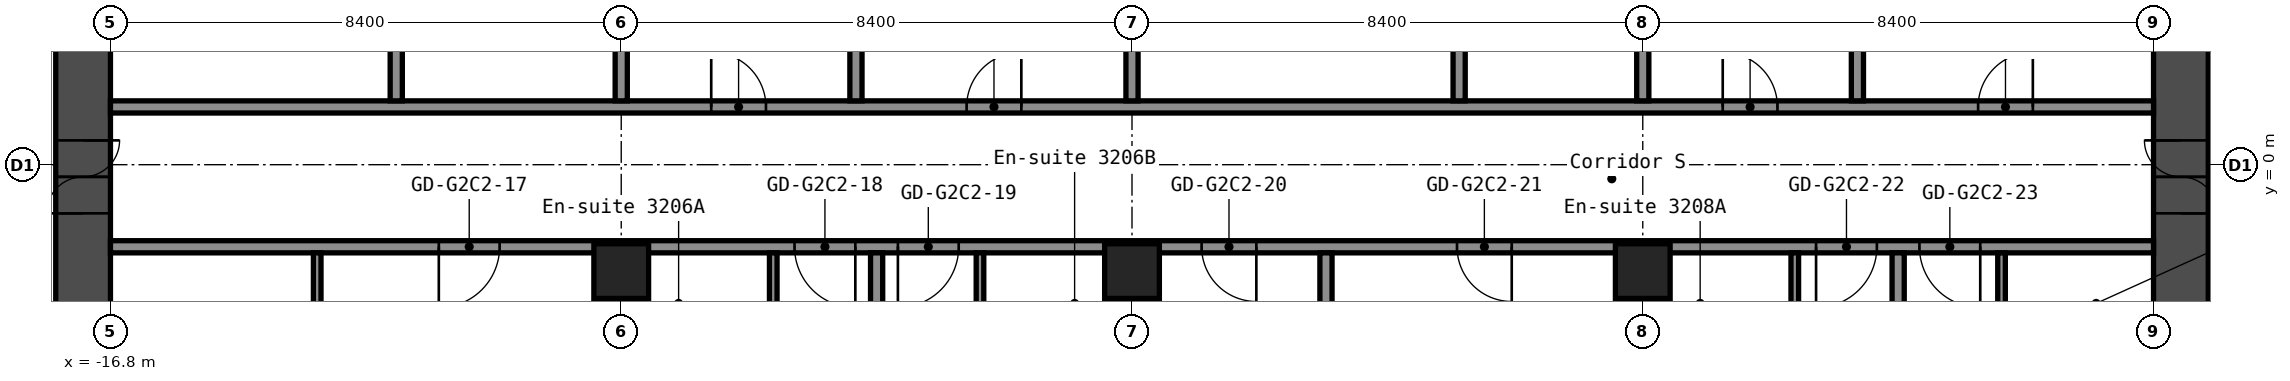
"""IFC4 building model, lengths in metres.
Left out: names, types, materials, properties, quantities, classifications, styles, units other than length and angle.
Written with IfcOpenShell. Run it as: python <this file> out.ifc"""

import sys

from ifc_helpers import new_model, si_unit, direction, frame, frame_2d, origin, origin_2d, place, context, subcontext, project, spatial, rectangle, hollow_rectangle, extrude, element, fill, save


model = new_model("IFC4")
c1 = context("Model", 3, precision=1e-05, world=origin(), true_north=direction((0.0, 1.0)))
c2 = subcontext(c1, "Body", "Model", "MODEL_VIEW")
j1 = project(units=[si_unit("LENGTHUNIT", "METRE"), si_unit("PLANEANGLEUNIT", "RADIAN")], contexts=[c1])
p1 = place(None, origin())
s1 = spatial("IfcSite", under=j1, at=p1, CompositionType="ELEMENT")
p2 = place(p1, origin())
s2 = spatial("IfcBuilding", under=s1, at=p2, CompositionType="ELEMENT")
p3 = place(p2, frame((0.0, 0.0, 113.8)))
s3 = spatial("IfcBuildingStorey", under=s2, at=p3, CompositionType="ELEMENT", Elevation=113.8)
for number, where, z_axis, x_axis in (
    (1, (-8.4, -1.75, 0.0), (0.0, 0.0, 1.0), (1.0, 0.0, 0.0)),
    (2, (0.0, -1.75, 0.0), (0.0, 0.0, 1.0), (1.0, 0.0, 0.0)),
    (3, (8.4, -1.75, 0.0), (0.0, 0.0, 1.0), (1.0, 0.0, 0.0)),
):
    element("IfcColumn", number, at=place(p3, frame(where, z_axis=z_axis, x_axis=x_axis)), inside=s3, PredefinedType="COLUMN", context=c2, shape_type="SweptSolid", body=[
        extrude(hollow_rectangle(XDim=0.9, YDim=0.9, WallThickness=0.036, at=origin_2d()), origin(), (0.0, 0.0, 1.0), 2.8),
    ])
p4 = place(p3, frame((-17.25, -8.4, 0.0), z_axis=(0.0, 0.0, 1.0), x_axis=(0.0, 1.0, 0.0)))
e4 = element("IfcWall", 4, at=p4, inside=s3, PredefinedType="SHEAR", context=c2, shape_type="SweptSolid", body=[
    extrude(rectangle(XDim=16.8, YDim=0.9, at=frame_2d((8.4, 0.0))), origin(), (0.0, 0.0, 1.0), 2.8),
])
p5 = place(p4, frame((7.6, 0.0, 0.0)))
e5 = element("IfcOpeningElement", 5, at=p5, cuts=e4, PredefinedType="OPENING", context=c2, shape_type="SweptSolid", body=[
    extrude(rectangle(XDim=1.2, YDim=2.1, at=frame_2d((0.6, 1.05))), frame((0.0, 0.46, 0.0), z_axis=(0.0, -1.0, 0.0), x_axis=(1.0, 0.0, 0.0)), (0.0, 0.0, 1.0), 0.92),
])
p6 = place(p3, frame((17.25, -8.4, 0.0), z_axis=(0.0, 0.0, 1.0), x_axis=(0.0, 1.0, 0.0)))
e6 = element("IfcWall", 6, at=p6, inside=s3, PredefinedType="SHEAR", context=c2, shape_type="SweptSolid", body=[
    extrude(rectangle(XDim=16.8, YDim=0.9, at=frame_2d((8.4, 0.0))), origin(), (0.0, 0.0, 1.0), 2.8),
])
p7 = place(p6, frame((7.6, 0.0, 0.0)))
e7 = element("IfcOpeningElement", 7, at=p7, cuts=e6, PredefinedType="OPENING", context=c2, shape_type="SweptSolid", body=[
    extrude(rectangle(XDim=1.2, YDim=2.1, at=frame_2d((0.6, 1.05))), frame((0.0, 0.46, 0.0), z_axis=(0.0, -1.0, 0.0), x_axis=(1.0, 0.0, 0.0)), (0.0, 0.0, 1.0), 0.92),
])
p8 = place(p3, frame((-16.8, -1.35, 0.0), z_axis=(0.0, 0.0, 1.0), x_axis=(1.0, 0.0, 0.0)))
e8 = element("IfcWall", 8, at=p8, inside=s3, PredefinedType="PARTITIONING", context=c2, shape_type="SweptSolid", body=[
    extrude(rectangle(XDim=33.6, YDim=0.2, at=frame_2d((16.8, 0.0))), origin(), (0.0, 0.0, 1.0), 2.8),
])
p9 = place(p8, frame((5.4, 0.0, 0.0)))
e9 = element("IfcOpeningElement", 9, at=p9, cuts=e8, PredefinedType="OPENING", context=c2, shape_type="SweptSolid", body=[
    extrude(rectangle(XDim=1.0, YDim=2.1, at=frame_2d((0.5, 1.05))), frame((0.0, 0.11, 0.0), z_axis=(0.0, -1.0, 0.0), x_axis=(1.0, 0.0, 0.0)), (0.0, 0.0, 1.0), 0.22),
])
p10 = place(p8, frame((11.25, 0.0, 0.0)))
e10 = element("IfcOpeningElement", 10, at=p10, cuts=e8, PredefinedType="OPENING", context=c2, shape_type="SweptSolid", body=[
    extrude(rectangle(XDim=1.0, YDim=2.1, at=frame_2d((0.5, 1.05))), frame((0.0, 0.11, 0.0), z_axis=(0.0, -1.0, 0.0), x_axis=(1.0, 0.0, 0.0)), (0.0, 0.0, 1.0), 0.22),
])
p11 = place(p8, frame((12.95, 0.0, 0.0)))
e11 = element("IfcOpeningElement", 11, at=p11, cuts=e8, PredefinedType="OPENING", context=c2, shape_type="SweptSolid", body=[
    extrude(rectangle(XDim=1.0, YDim=2.1, at=frame_2d((0.5, 1.05))), frame((0.0, 0.11, 0.0), z_axis=(0.0, -1.0, 0.0), x_axis=(1.0, 0.0, 0.0)), (0.0, 0.0, 1.0), 0.22),
])
p12 = place(p8, frame((17.945, 0.0, 0.0)))
e12 = element("IfcOpeningElement", 12, at=p12, cuts=e8, PredefinedType="OPENING", context=c2, shape_type="SweptSolid", body=[
    extrude(rectangle(XDim=0.9, YDim=2.1, at=frame_2d((0.45, 1.05))), frame((0.0, 0.11, 0.0), z_axis=(0.0, -1.0, 0.0), x_axis=(1.0, 0.0, 0.0)), (0.0, 0.0, 1.0), 0.22),
])
p13 = place(p8, frame((22.145, 0.0, 0.0)))
e13 = element("IfcOpeningElement", 13, at=p13, cuts=e8, PredefinedType="OPENING", context=c2, shape_type="SweptSolid", body=[
    extrude(rectangle(XDim=0.9, YDim=2.1, at=frame_2d((0.45, 1.05))), frame((0.0, 0.11, 0.0), z_axis=(0.0, -1.0, 0.0), x_axis=(1.0, 0.0, 0.0)), (0.0, 0.0, 1.0), 0.22),
])
p14 = place(p8, frame((28.05, 0.0, 0.0)))
e14 = element("IfcOpeningElement", 14, at=p14, cuts=e8, PredefinedType="OPENING", context=c2, shape_type="SweptSolid", body=[
    extrude(rectangle(XDim=1.0, YDim=2.1, at=frame_2d((0.5, 1.05))), frame((0.0, 0.11, 0.0), z_axis=(0.0, -1.0, 0.0), x_axis=(1.0, 0.0, 0.0)), (0.0, 0.0, 1.0), 0.22),
])
p15 = place(p8, frame((29.75, 0.0, 0.0)))
e15 = element("IfcOpeningElement", 15, at=p15, cuts=e8, PredefinedType="OPENING", context=c2, shape_type="SweptSolid", body=[
    extrude(rectangle(XDim=1.0, YDim=2.1, at=frame_2d((0.5, 1.05))), frame((0.0, 0.11, 0.0), z_axis=(0.0, -1.0, 0.0), x_axis=(1.0, 0.0, 0.0)), (0.0, 0.0, 1.0), 0.22),
])
p16 = place(p3, frame((-16.8, 0.95, 0.0), z_axis=(0.0, 0.0, 1.0), x_axis=(1.0, 0.0, 0.0)))
e16 = element("IfcWall", 16, at=p16, inside=s3, PredefinedType="PARTITIONING", context=c2, shape_type="SweptSolid", body=[
    extrude(rectangle(XDim=33.6, YDim=0.2, at=frame_2d((16.8, 0.0))), origin(), (0.0, 0.0, 1.0), 2.8),
])
p17 = place(p16, frame((9.88, 0.0, 0.0)))
e17 = element("IfcOpeningElement", 17, at=p17, cuts=e16, PredefinedType="OPENING", context=c2, shape_type="SweptSolid", body=[
    extrude(rectangle(XDim=0.9, YDim=2.1, at=frame_2d((0.45, 1.05))), frame((0.0, 0.11, 0.0), z_axis=(0.0, -1.0, 0.0), x_axis=(1.0, 0.0, 0.0)), (0.0, 0.0, 1.0), 0.22),
])
p18 = place(p16, frame((14.08, 0.0, 0.0)))
e18 = element("IfcOpeningElement", 18, at=p18, cuts=e16, PredefinedType="OPENING", context=c2, shape_type="SweptSolid", body=[
    extrude(rectangle(XDim=0.9, YDim=2.1, at=frame_2d((0.45, 1.05))), frame((0.0, 0.11, 0.0), z_axis=(0.0, -1.0, 0.0), x_axis=(1.0, 0.0, 0.0)), (0.0, 0.0, 1.0), 0.22),
])
p19 = place(p16, frame((26.515, 0.0, 0.0)))
e19 = element("IfcOpeningElement", 19, at=p19, cuts=e16, PredefinedType="OPENING", context=c2, shape_type="SweptSolid", body=[
    extrude(rectangle(XDim=0.9, YDim=2.1, at=frame_2d((0.45, 1.05))), frame((0.0, 0.11, 0.0), z_axis=(0.0, -1.0, 0.0), x_axis=(1.0, 0.0, 0.0)), (0.0, 0.0, 1.0), 0.22),
])
p20 = place(p16, frame((30.715, 0.0, 0.0)))
e20 = element("IfcOpeningElement", 20, at=p20, cuts=e16, PredefinedType="OPENING", context=c2, shape_type="SweptSolid", body=[
    extrude(rectangle(XDim=0.9, YDim=2.1, at=frame_2d((0.45, 1.05))), frame((0.0, 0.11, 0.0), z_axis=(0.0, -1.0, 0.0), x_axis=(1.0, 0.0, 0.0)), (0.0, 0.0, 1.0), 0.22),
])
p21 = place(p3, frame((-13.4, -4.75, 0.0), z_axis=(0.0, 0.0, 1.0), x_axis=(0.0, 1.0, 0.0)))
e21 = element("IfcWall", 21, at=p21, inside=s3, PredefinedType="PARTITIONING", context=c2, shape_type="SweptSolid", body=[
    extrude(rectangle(XDim=3.3, YDim=0.125, at=frame_2d((1.65, 0.0))), origin(), (0.0, 0.0, 1.0), 2.8),
])
p22 = place(p3, frame((-12.1, 1.05, 0.0), z_axis=(0.0, 0.0, 1.0), x_axis=(0.0, 1.0, 0.0)))
e22 = element("IfcWall", 22, at=p22, inside=s3, PredefinedType="PARTITIONING", context=c2, shape_type="SweptSolid", body=[
    extrude(rectangle(XDim=5.9, YDim=0.2, at=frame_2d((2.95, 0.0))), origin(), (0.0, 0.0, 1.0), 2.8),
])
p23 = place(p3, frame((-8.4, -15.55, 0.0), z_axis=(0.0, 0.0, 1.0), x_axis=(0.0, 1.0, 0.0)))
e23 = element("IfcWall", 23, at=p23, inside=s3, PredefinedType="PARTITIONING", context=c2, shape_type="SweptSolid", body=[
    extrude(rectangle(XDim=13.36, YDim=0.2, at=frame_2d((6.68, 0.0))), origin(), (0.0, 0.0, 1.0), 2.8),
])
p24 = place(p3, frame((-8.4, 1.05, 0.0), z_axis=(0.0, 0.0, 1.0), x_axis=(0.0, 1.0, 0.0)))
e24 = element("IfcWall", 24, at=p24, inside=s3, PredefinedType="PARTITIONING", context=c2, shape_type="SweptSolid", body=[
    extrude(rectangle(XDim=5.9, YDim=0.2, at=frame_2d((2.95, 0.0))), origin(), (0.0, 0.0, 1.0), 2.8),
])
p25 = place(p3, frame((-5.9, -4.35, 0.0), z_axis=(0.0, 0.0, 1.0), x_axis=(0.0, 1.0, 0.0)))
e25 = element("IfcWall", 25, at=p25, inside=s3, PredefinedType="PARTITIONING", context=c2, shape_type="SweptSolid", body=[
    extrude(rectangle(XDim=2.9, YDim=0.125, at=frame_2d((1.45, 0.0))), origin(), (0.0, 0.0, 1.0), 2.8),
])
p26 = place(p25, frame((0.6, 0.0, 0.0)))
e26 = element("IfcOpeningElement", 26, at=p26, cuts=e25, PredefinedType="OPENING", context=c2, shape_type="SweptSolid", body=[
    extrude(rectangle(XDim=0.8, YDim=2.1, at=frame_2d((0.4, 1.05))), frame((0.0, 0.073, 0.0), z_axis=(0.0, -1.0, 0.0), x_axis=(1.0, 0.0, 0.0)), (0.0, 0.0, 1.0), 0.145),
])
p27 = place(p3, frame((-4.54, 1.05, 0.0), z_axis=(0.0, 0.0, 1.0), x_axis=(0.0, 1.0, 0.0)))
e27 = element("IfcWall", 27, at=p27, inside=s3, PredefinedType="PARTITIONING", context=c2, shape_type="SweptSolid", body=[
    extrude(rectangle(XDim=5.9, YDim=0.2, at=frame_2d((2.95, 0.0))), origin(), (0.0, 0.0, 1.0), 2.8),
])
p28 = place(p3, frame((-4.2, -15.55, 0.0), z_axis=(0.0, 0.0, 1.0), x_axis=(0.0, 1.0, 0.0)))
e28 = element("IfcWall", 28, at=p28, inside=s3, PredefinedType="PARTITIONING", context=c2, shape_type="SweptSolid", body=[
    extrude(rectangle(XDim=14.1, YDim=0.2, at=frame_2d((7.05, 0.0))), origin(), (0.0, 0.0, 1.0), 2.8),
])
p29 = place(p3, frame((-2.5, -4.35, 0.0), z_axis=(0.0, 0.0, 1.0), x_axis=(0.0, 1.0, 0.0)))
e29 = element("IfcWall", 29, at=p29, inside=s3, PredefinedType="PARTITIONING", context=c2, shape_type="SweptSolid", body=[
    extrude(rectangle(XDim=2.9, YDim=0.125, at=frame_2d((1.45, 0.0))), origin(), (0.0, 0.0, 1.0), 2.8),
])
p30 = place(p29, frame((0.6, 0.0, 0.0)))
e30 = element("IfcOpeningElement", 30, at=p30, cuts=e29, PredefinedType="OPENING", context=c2, shape_type="SweptSolid", body=[
    extrude(rectangle(XDim=0.8, YDim=2.1, at=frame_2d((0.4, 1.05))), frame((0.0, 0.073, 0.0), z_axis=(0.0, -1.0, 0.0), x_axis=(1.0, 0.0, 0.0)), (0.0, 0.0, 1.0), 0.145),
])
p31 = place(p3, frame((0.0, -15.55, 0.0), z_axis=(0.0, 0.0, 1.0), x_axis=(0.0, 1.0, 0.0)))
e31 = element("IfcWall", 31, at=p31, inside=s3, PredefinedType="PARTITIONING", context=c2, shape_type="SweptSolid", body=[
    extrude(rectangle(XDim=13.36, YDim=0.2, at=frame_2d((6.68, 0.0))), origin(), (0.0, 0.0, 1.0), 2.8),
])
p32 = place(p3, frame((0.0, 1.05, 0.0), z_axis=(0.0, 0.0, 1.0), x_axis=(0.0, 1.0, 0.0)))
e32 = element("IfcWall", 32, at=p32, inside=s3, PredefinedType="PARTITIONING", context=c2, shape_type="SweptSolid", body=[
    extrude(rectangle(XDim=5.9, YDim=0.2, at=frame_2d((2.95, 0.0))), origin(), (0.0, 0.0, 1.0), 2.8),
])
p33 = place(p3, frame((3.19, -15.55, 0.0), z_axis=(0.0, 0.0, 1.0), x_axis=(0.0, 1.0, 0.0)))
e33 = element("IfcWall", 33, at=p33, inside=s3, PredefinedType="PARTITIONING", context=c2, shape_type="SweptSolid", body=[
    extrude(rectangle(XDim=14.1, YDim=0.2, at=frame_2d((7.05, 0.0))), origin(), (0.0, 0.0, 1.0), 2.8),
])
p34 = place(p3, frame((5.38, 1.05, 0.0), z_axis=(0.0, 0.0, 1.0), x_axis=(0.0, 1.0, 0.0)))
e34 = element("IfcWall", 34, at=p34, inside=s3, PredefinedType="PARTITIONING", context=c2, shape_type="SweptSolid", body=[
    extrude(rectangle(XDim=5.9, YDim=0.2, at=frame_2d((2.95, 0.0))), origin(), (0.0, 0.0, 1.0), 2.8),
])
p35 = place(p3, frame((8.4, -15.55, 0.0), z_axis=(0.0, 0.0, 1.0), x_axis=(0.0, 1.0, 0.0)))
e35 = element("IfcWall", 35, at=p35, inside=s3, PredefinedType="PARTITIONING", context=c2, shape_type="SweptSolid", body=[
    extrude(rectangle(XDim=13.36, YDim=0.2, at=frame_2d((6.68, 0.0))), origin(), (0.0, 0.0, 1.0), 2.8),
])
p36 = place(p3, frame((8.4, 1.05, 0.0), z_axis=(0.0, 0.0, 1.0), x_axis=(0.0, 1.0, 0.0)))
e36 = element("IfcWall", 36, at=p36, inside=s3, PredefinedType="PARTITIONING", context=c2, shape_type="SweptSolid", body=[
    extrude(rectangle(XDim=5.9, YDim=0.2, at=frame_2d((2.95, 0.0))), origin(), (0.0, 0.0, 1.0), 2.8),
])
p37 = place(p3, frame((10.9, -4.35, 0.0), z_axis=(0.0, 0.0, 1.0), x_axis=(0.0, 1.0, 0.0)))
e37 = element("IfcWall", 37, at=p37, inside=s3, PredefinedType="PARTITIONING", context=c2, shape_type="SweptSolid", body=[
    extrude(rectangle(XDim=2.9, YDim=0.125, at=frame_2d((1.45, 0.0))), origin(), (0.0, 0.0, 1.0), 2.8),
])
p38 = place(p37, frame((0.6, 0.0, 0.0)))
e38 = element("IfcOpeningElement", 38, at=p38, cuts=e37, PredefinedType="OPENING", context=c2, shape_type="SweptSolid", body=[
    extrude(rectangle(XDim=0.8, YDim=2.1, at=frame_2d((0.4, 1.05))), frame((0.0, 0.073, 0.0), z_axis=(0.0, -1.0, 0.0), x_axis=(1.0, 0.0, 0.0)), (0.0, 0.0, 1.0), 0.145),
])
p39 = place(p3, frame((11.93, 1.05, 0.0), z_axis=(0.0, 0.0, 1.0), x_axis=(0.0, 1.0, 0.0)))
e39 = element("IfcWall", 39, at=p39, inside=s3, PredefinedType="PARTITIONING", context=c2, shape_type="SweptSolid", body=[
    extrude(rectangle(XDim=5.9, YDim=0.2, at=frame_2d((2.95, 0.0))), origin(), (0.0, 0.0, 1.0), 2.8),
])
p40 = place(p3, frame((12.6, -15.55, 0.0), z_axis=(0.0, 0.0, 1.0), x_axis=(0.0, 1.0, 0.0)))
e40 = element("IfcWall", 40, at=p40, inside=s3, PredefinedType="PARTITIONING", context=c2, shape_type="SweptSolid", body=[
    extrude(rectangle(XDim=14.1, YDim=0.2, at=frame_2d((7.05, 0.0))), origin(), (0.0, 0.0, 1.0), 2.8),
])
p41 = place(p3, frame((14.3, -4.35, 0.0), z_axis=(0.0, 0.0, 1.0), x_axis=(0.0, 1.0, 0.0)))
e41 = element("IfcWall", 41, at=p41, inside=s3, PredefinedType="PARTITIONING", context=c2, shape_type="SweptSolid", body=[
    extrude(rectangle(XDim=2.9, YDim=0.125, at=frame_2d((1.45, 0.0))), origin(), (0.0, 0.0, 1.0), 2.8),
])
p42 = place(p41, frame((0.6, 0.0, 0.0)))
e42 = element("IfcOpeningElement", 42, at=p42, cuts=e41, PredefinedType="OPENING", context=c2, shape_type="SweptSolid", body=[
    extrude(rectangle(XDim=0.8, YDim=2.1, at=frame_2d((0.4, 1.05))), frame((0.0, 0.073, 0.0), z_axis=(0.0, -1.0, 0.0), x_axis=(1.0, 0.0, 0.0)), (0.0, 0.0, 1.0), 0.145),
])
p43 = place(p5, origin())
e43 = element("IfcDoor", 43, at=p43, inside=s3, OperationType="DOUBLE_DOOR_SINGLE_SWING", PredefinedType="DOOR", context=c2, shape_type="SweptSolid", body=[
    extrude(rectangle(XDim=1.2, YDim=2.1, at=frame_2d((0.6, 1.05))), frame((0.0, 0.025, 0.0), z_axis=(0.0, -1.0, 0.0), x_axis=(1.0, 0.0, 0.0)), (0.0, 0.0, 1.0), 0.05),
])
fill(e5, e43)
p44 = place(p7, origin())
e44 = element("IfcDoor", 44, at=p44, inside=s3, OperationType="DOUBLE_DOOR_SINGLE_SWING", PredefinedType="DOOR", context=c2, shape_type="SweptSolid", body=[
    extrude(rectangle(XDim=1.2, YDim=2.1, at=frame_2d((0.6, 1.05))), frame((0.0, 0.025, 0.0), z_axis=(0.0, -1.0, 0.0), x_axis=(1.0, 0.0, 0.0)), (0.0, 0.0, 1.0), 0.05),
])
fill(e7, e44)
p45 = place(p9, origin())
e45 = element("IfcDoor", 45, at=p45, inside=s3, OperationType="SINGLE_SWING_LEFT", PredefinedType="DOOR", context=c2, shape_type="SweptSolid", body=[
    extrude(rectangle(XDim=1.0, YDim=2.1, at=frame_2d((0.5, 1.05))), frame((0.0, 0.025, 0.0), z_axis=(0.0, -1.0, 0.0), x_axis=(1.0, 0.0, 0.0)), (0.0, 0.0, 1.0), 0.05),
])
fill(e9, e45)
p46 = place(p10, origin())
e46 = element("IfcDoor", 46, at=p46, inside=s3, OperationType="SINGLE_SWING_RIGHT", PredefinedType="DOOR", context=c2, shape_type="SweptSolid", body=[
    extrude(rectangle(XDim=1.0, YDim=2.1, at=frame_2d((0.5, 1.05))), frame((0.0, 0.025, 0.0), z_axis=(0.0, -1.0, 0.0), x_axis=(1.0, 0.0, 0.0)), (0.0, 0.0, 1.0), 0.05),
])
fill(e10, e46)
p47 = place(p11, origin())
e47 = element("IfcDoor", 47, at=p47, inside=s3, OperationType="SINGLE_SWING_LEFT", PredefinedType="DOOR", context=c2, shape_type="SweptSolid", body=[
    extrude(rectangle(XDim=1.0, YDim=2.1, at=frame_2d((0.5, 1.05))), frame((0.0, 0.025, 0.0), z_axis=(0.0, -1.0, 0.0), x_axis=(1.0, 0.0, 0.0)), (0.0, 0.0, 1.0), 0.05),
])
fill(e11, e47)
p48 = place(p12, origin())
e48 = element("IfcDoor", 48, at=p48, inside=s3, OperationType="SINGLE_SWING_RIGHT", PredefinedType="DOOR", context=c2, shape_type="SweptSolid", body=[
    extrude(rectangle(XDim=0.9, YDim=2.1, at=frame_2d((0.45, 1.05))), frame((0.0, 0.025, 0.0), z_axis=(0.0, -1.0, 0.0), x_axis=(1.0, 0.0, 0.0)), (0.0, 0.0, 1.0), 0.05),
])
fill(e12, e48)
p49 = place(p13, origin())
e49 = element("IfcDoor", 49, at=p49, inside=s3, OperationType="SINGLE_SWING_RIGHT", PredefinedType="DOOR", context=c2, shape_type="SweptSolid", body=[
    extrude(rectangle(XDim=0.9, YDim=2.1, at=frame_2d((0.45, 1.05))), frame((0.0, 0.025, 0.0), z_axis=(0.0, -1.0, 0.0), x_axis=(1.0, 0.0, 0.0)), (0.0, 0.0, 1.0), 0.05),
])
fill(e13, e49)
p50 = place(p14, origin())
e50 = element("IfcDoor", 50, at=p50, inside=s3, OperationType="SINGLE_SWING_LEFT", PredefinedType="DOOR", context=c2, shape_type="SweptSolid", body=[
    extrude(rectangle(XDim=1.0, YDim=2.1, at=frame_2d((0.5, 1.05))), frame((0.0, 0.025, 0.0), z_axis=(0.0, -1.0, 0.0), x_axis=(1.0, 0.0, 0.0)), (0.0, 0.0, 1.0), 0.05),
])
fill(e14, e50)
p51 = place(p15, origin())
e51 = element("IfcDoor", 51, at=p51, inside=s3, OperationType="SINGLE_SWING_RIGHT", PredefinedType="DOOR", context=c2, shape_type="SweptSolid", body=[
    extrude(rectangle(XDim=1.0, YDim=2.1, at=frame_2d((0.5, 1.05))), frame((0.0, 0.025, 0.0), z_axis=(0.0, -1.0, 0.0), x_axis=(1.0, 0.0, 0.0)), (0.0, 0.0, 1.0), 0.05),
])
fill(e15, e51)
p52 = place(p17, origin())
e52 = element("IfcDoor", 52, at=p52, inside=s3, OperationType="SINGLE_SWING_RIGHT", PredefinedType="DOOR", context=c2, shape_type="SweptSolid", body=[
    extrude(rectangle(XDim=0.9, YDim=2.1, at=frame_2d((0.45, 1.05))), frame((0.0, 0.025, 0.0), z_axis=(0.0, -1.0, 0.0), x_axis=(1.0, 0.0, 0.0)), (0.0, 0.0, 1.0), 0.05),
])
fill(e17, e52)
p53 = place(p18, origin())
e53 = element("IfcDoor", 53, at=p53, inside=s3, OperationType="SINGLE_SWING_LEFT", PredefinedType="DOOR", context=c2, shape_type="SweptSolid", body=[
    extrude(rectangle(XDim=0.9, YDim=2.1, at=frame_2d((0.45, 1.05))), frame((0.0, 0.025, 0.0), z_axis=(0.0, -1.0, 0.0), x_axis=(1.0, 0.0, 0.0)), (0.0, 0.0, 1.0), 0.05),
])
fill(e18, e53)
p54 = place(p19, origin())
e54 = element("IfcDoor", 54, at=p54, inside=s3, OperationType="SINGLE_SWING_RIGHT", PredefinedType="DOOR", context=c2, shape_type="SweptSolid", body=[
    extrude(rectangle(XDim=0.9, YDim=2.1, at=frame_2d((0.45, 1.05))), frame((0.0, 0.025, 0.0), z_axis=(0.0, -1.0, 0.0), x_axis=(1.0, 0.0, 0.0)), (0.0, 0.0, 1.0), 0.05),
])
fill(e19, e54)
p55 = place(p20, origin())
e55 = element("IfcDoor", 55, at=p55, inside=s3, OperationType="SINGLE_SWING_LEFT", PredefinedType="DOOR", context=c2, shape_type="SweptSolid", body=[
    extrude(rectangle(XDim=0.9, YDim=2.1, at=frame_2d((0.45, 1.05))), frame((0.0, 0.025, 0.0), z_axis=(0.0, -1.0, 0.0), x_axis=(1.0, 0.0, 0.0)), (0.0, 0.0, 1.0), 0.05),
])
fill(e20, e55)
save(model, sys.argv[1])
